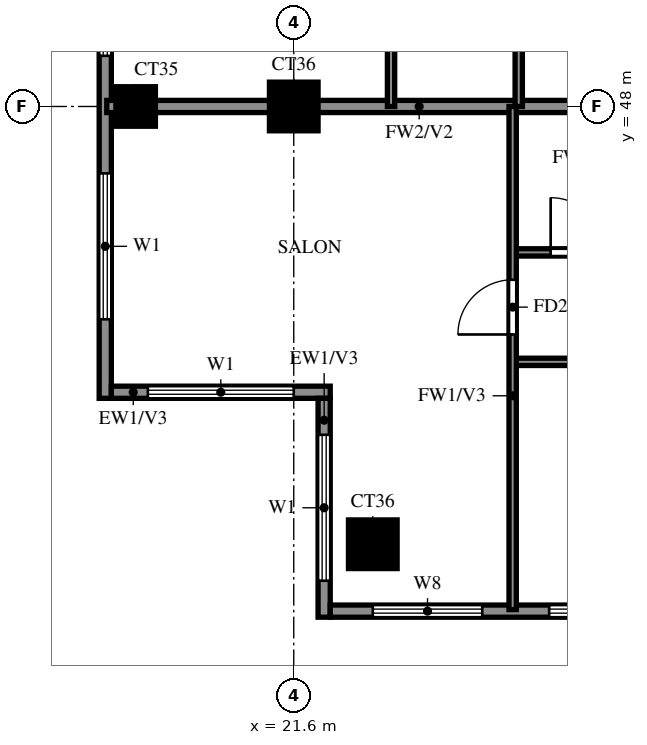
"""IFC4 building model, lengths in metres.
Left out: names, types, materials, properties, quantities, classifications, styles, units other than length and angle.
Written with IfcOpenShell. Run it as: python <this file> out.ifc"""

import sys

from ifc_helpers import new_model, si_unit, direction, frame, frame_2d, origin, origin_2d, place, context, subcontext, project, spatial, rectangle, extrude, source, transform, mapped, element, fill, save


model = new_model("IFC4")
c1 = context("Model", 3, precision=1e-05, world=origin(), true_north=direction((0.0, 1.0)))
c2 = subcontext(c1, "Body", "Model", "MODEL_VIEW")
j1 = project(units=[si_unit("LENGTHUNIT", "METRE"), si_unit("PLANEANGLEUNIT", "RADIAN")], contexts=[c1])
p1 = place(None, origin())
s1 = spatial("IfcSite", under=j1, at=p1, CompositionType="ELEMENT")
p2 = place(p1, origin())
s2 = spatial("IfcBuilding", under=s1, at=p2, CompositionType="ELEMENT")
p3 = place(p2, frame((0.0, 0.0, 232.5)))
s3 = spatial("IfcBuildingStorey", under=s2, at=p3, CompositionType="ELEMENT", Elevation=232.5)
m1 = source(origin(), c2, "Body", "SweptSolid", [
    extrude(rectangle(XDim=0.8, YDim=0.8, at=origin_2d()), origin(), (0.0, 0.0, 1.0), 3.22),
])
p4 = place(p3, frame((22.9, 40.8, 0.0), z_axis=(0.0, 0.0, 1.0), x_axis=(1.0, 0.0, 0.0)))
e1 = element("IfcColumn", 1, at=p4, inside=s3, PredefinedType="COLUMN", context=c2, shape_type="MappedRepresentation", body=[
    mapped(m1, transform((0.0, 0.0, 0.0))),
])
m2 = source(origin(), c2, "Body", "SweptSolid", [
    extrude(rectangle(XDim=0.65, YDim=0.65, at=origin_2d()), origin(), (0.0, 0.0, 1.0), 3.22),
])
p5 = place(p3, frame((19.0, 48.0, 0.0), z_axis=(0.0, 0.0, 1.0), x_axis=(1.0, 0.0, 0.0)))
e2 = element("IfcColumn", 2, at=p5, inside=s3, PredefinedType="COLUMN", context=c2, shape_type="MappedRepresentation", body=[
    mapped(m2, transform((0.0, 0.0, 0.0))),
])
p6 = place(p3, frame((21.6, 48.0, 0.0), z_axis=(0.0, 0.0, 1.0), x_axis=(1.0, 0.0, 0.0)))
e3 = element("IfcColumn", 3, at=p6, inside=s3, PredefinedType="COLUMN", context=c2, shape_type="MappedRepresentation", body=[
    mapped(m1, transform((0.0, 0.0, 0.0))),
])
p7 = place(p3, frame((18.5, 76.6, 0.0), z_axis=(0.0, 0.0, 1.0), x_axis=(0.0, -1.0, 0.0)))
e4 = element("IfcWall", 4, at=p7, inside=s3, PredefinedType="SOLIDWALL", context=c2, shape_type="SweptSolid", body=[
    extrude(rectangle(XDim=33.4, YDim=0.2, at=frame_2d((16.7, 0.0))), origin(), (0.0, 0.0, 1.0), 3.22),
])
p8 = place(p7, frame((15.1, 0.0, 0.0)))
e5 = element("IfcOpeningElement", 5, at=p8, cuts=e4, PredefinedType="OPENING", context=c2, shape_type="SweptSolid", body=[
    extrude(rectangle(XDim=1.8, YDim=2.4, at=frame_2d((0.9, 1.2))), frame((0.0, 0.11, 0.0), z_axis=(0.0, -1.0, 0.0), x_axis=(1.0, 0.0, 0.0)), (0.0, 0.0, 1.0), 0.22),
])
p9 = place(p7, frame((29.7, 0.0, 0.6)))
e6 = element("IfcOpeningElement", 6, at=p9, cuts=e4, PredefinedType="OPENING", context=c2, shape_type="SweptSolid", body=[
    extrude(rectangle(XDim=2.4, YDim=2.4, at=frame_2d((1.2, 1.2))), frame((0.0, 0.11, 0.0), z_axis=(0.0, -1.0, 0.0), x_axis=(1.0, 0.0, 0.0)), (0.0, 0.0, 1.0), 0.22),
])
p10 = place(p7, frame((22.233, 0.0, 0.6)))
e7 = element("IfcOpeningElement", 7, at=p10, cuts=e4, PredefinedType="OPENING", context=c2, shape_type="SweptSolid", body=[
    extrude(rectangle(XDim=2.4, YDim=2.4, at=frame_2d((1.2, 1.2))), frame((0.0, 0.11, 0.0), z_axis=(0.0, -1.0, 0.0), x_axis=(1.0, 0.0, 0.0)), (0.0, 0.0, 1.0), 0.22),
])
p11 = place(p7, frame((25.367, 0.0, 0.6)))
e8 = element("IfcOpeningElement", 8, at=p11, cuts=e4, PredefinedType="OPENING", context=c2, shape_type="SweptSolid", body=[
    extrude(rectangle(XDim=2.4, YDim=2.4, at=frame_2d((1.2, 1.2))), frame((0.0, 0.11, 0.0), z_axis=(0.0, -1.0, 0.0), x_axis=(1.0, 0.0, 0.0)), (0.0, 0.0, 1.0), 0.22),
])
p12 = place(p7, frame((19.3, 0.0, 0.6)))
e9 = element("IfcOpeningElement", 9, at=p12, cuts=e4, PredefinedType="OPENING", context=c2, shape_type="SweptSolid", body=[
    extrude(rectangle(XDim=1.8, YDim=2.4, at=frame_2d((0.9, 1.2))), frame((0.0, 0.11, 0.0), z_axis=(0.0, -1.0, 0.0), x_axis=(1.0, 0.0, 0.0)), (0.0, 0.0, 1.0), 0.22),
])
p13 = place(p7, frame((10.75, 0.0, 0.6)))
e10 = element("IfcOpeningElement", 10, at=p13, cuts=e4, PredefinedType="OPENING", context=c2, shape_type="SweptSolid", body=[
    extrude(rectangle(XDim=0.9, YDim=2.4, at=frame_2d((0.45, 1.2))), frame((0.0, 0.11, 0.0), z_axis=(0.0, -1.0, 0.0), x_axis=(1.0, 0.0, 0.0)), (0.0, 0.0, 1.0), 0.22),
])
p14 = place(p7, frame((12.7, 0.0, 0.6)))
e11 = element("IfcOpeningElement", 11, at=p14, cuts=e4, PredefinedType="OPENING", context=c2, shape_type="SweptSolid", body=[
    extrude(rectangle(XDim=1.2, YDim=2.4, at=frame_2d((0.6, 1.2))), frame((0.0, 0.11, 0.0), z_axis=(0.0, -1.0, 0.0), x_axis=(1.0, 0.0, 0.0)), (0.0, 0.0, 1.0), 0.22),
])
p15 = place(p7, frame((7.6, 0.0, 0.6)))
e12 = element("IfcOpeningElement", 12, at=p15, cuts=e4, PredefinedType="OPENING", context=c2, shape_type="SweptSolid", body=[
    extrude(rectangle(XDim=2.4, YDim=2.4, at=frame_2d((1.2, 1.2))), frame((0.0, 0.11, 0.0), z_axis=(0.0, -1.0, 0.0), x_axis=(1.0, 0.0, 0.0)), (0.0, 0.0, 1.0), 0.22),
])
p16 = place(p7, frame((4.0, 0.0, 0.6)))
e13 = element("IfcOpeningElement", 13, at=p16, cuts=e4, PredefinedType="OPENING", context=c2, shape_type="SweptSolid", body=[
    extrude(rectangle(XDim=2.4, YDim=2.4, at=frame_2d((1.2, 1.2))), frame((0.0, 0.11, 0.0), z_axis=(0.0, -1.0, 0.0), x_axis=(1.0, 0.0, 0.0)), (0.0, 0.0, 1.0), 0.22),
])
p17 = place(p7, frame((0.6, 0.0, 0.6)))
e14 = element("IfcOpeningElement", 14, at=p17, cuts=e4, PredefinedType="OPENING", context=c2, shape_type="SweptSolid", body=[
    extrude(rectangle(XDim=2.4, YDim=2.4, at=frame_2d((1.2, 1.2))), frame((0.0, 0.11, 0.0), z_axis=(0.0, -1.0, 0.0), x_axis=(1.0, 0.0, 0.0)), (0.0, 0.0, 1.0), 0.22),
])
p18 = place(p3, frame((18.6, 43.3, 0.0), z_axis=(0.0, 0.0, 1.0), x_axis=(1.0, 0.0, 0.0)))
e15 = element("IfcWall", 15, at=p18, inside=s3, PredefinedType="SOLIDWALL", context=c2, shape_type="SweptSolid", body=[
    extrude(rectangle(XDim=3.6, YDim=0.2, at=frame_2d((1.8, 0.0))), origin(), (0.0, 0.0, 1.0), 3.22),
])
p19 = place(p18, frame((0.6, 0.0, 0.6)))
e16 = element("IfcOpeningElement", 16, at=p19, cuts=e15, PredefinedType="OPENING", context=c2, shape_type="SweptSolid", body=[
    extrude(rectangle(XDim=2.4, YDim=2.4, at=frame_2d((1.2, 1.2))), frame((0.0, 0.11, 0.0), z_axis=(0.0, -1.0, 0.0), x_axis=(1.0, 0.0, 0.0)), (0.0, 0.0, 1.0), 0.22),
])
p20 = place(p3, frame((22.1, 43.2, 0.0), z_axis=(0.0, 0.0, 1.0), x_axis=(0.0, -1.0, 0.0)))
e17 = element("IfcWall", 17, at=p20, inside=s3, PredefinedType="SOLIDWALL", context=c2, shape_type="SweptSolid", body=[
    extrude(rectangle(XDim=3.6, YDim=0.2, at=frame_2d((1.8, 0.0))), origin(), (0.0, 0.0, 1.0), 3.22),
])
p21 = place(p20, frame((0.6, 0.0, 0.6)))
e18 = element("IfcOpeningElement", 18, at=p21, cuts=e17, PredefinedType="OPENING", context=c2, shape_type="SweptSolid", body=[
    extrude(rectangle(XDim=2.4, YDim=2.4, at=frame_2d((1.2, 1.2))), frame((0.0, 0.11, 0.0), z_axis=(0.0, -1.0, 0.0), x_axis=(1.0, 0.0, 0.0)), (0.0, 0.0, 1.0), 0.22),
])
p22 = place(p3, frame((22.2, 39.7, 0.0), z_axis=(0.0, 0.0, 1.0), x_axis=(1.0, 0.0, 0.0)))
e19 = element("IfcWall", 19, at=p22, inside=s3, PredefinedType="SOLIDWALL", context=c2, shape_type="SweptSolid", body=[
    extrude(rectangle(XDim=19.8, YDim=0.2, at=frame_2d((9.9, 0.0))), origin(), (0.0, 0.0, 1.0), 3.22),
])
p23 = place(p22, frame((0.7, 0.0, 0.6)))
e20 = element("IfcOpeningElement", 20, at=p23, cuts=e19, PredefinedType="OPENING", context=c2, shape_type="SweptSolid", body=[
    extrude(rectangle(XDim=1.8, YDim=2.4, at=frame_2d((0.9, 1.2))), frame((0.0, 0.11, 0.0), z_axis=(0.0, -1.0, 0.0), x_axis=(1.0, 0.0, 0.0)), (0.0, 0.0, 1.0), 0.22),
])
p24 = place(p22, frame((3.6, 0.0, 0.6)))
e21 = element("IfcOpeningElement", 21, at=p24, cuts=e19, PredefinedType="OPENING", context=c2, shape_type="SweptSolid", body=[
    extrude(rectangle(XDim=2.4, YDim=2.4, at=frame_2d((1.2, 1.2))), frame((0.0, 0.11, 0.0), z_axis=(0.0, -1.0, 0.0), x_axis=(1.0, 0.0, 0.0)), (0.0, 0.0, 1.0), 0.22),
])
p25 = place(p22, frame((7.8, 0.0, 0.6)))
e22 = element("IfcOpeningElement", 22, at=p25, cuts=e19, PredefinedType="OPENING", context=c2, shape_type="SweptSolid", body=[
    extrude(rectangle(XDim=2.4, YDim=2.4, at=frame_2d((1.2, 1.2))), frame((0.0, 0.11, 0.0), z_axis=(0.0, -1.0, 0.0), x_axis=(1.0, 0.0, 0.0)), (0.0, 0.0, 1.0), 0.22),
])
p26 = place(p3, frame((18.525, 48.0, 0.0), z_axis=(0.0, 0.0, 1.0), x_axis=(1.0, 0.0, 0.0)))
e23 = element("IfcWall", 23, at=p26, inside=s3, PredefinedType="SOLIDWALL", context=c2, shape_type="SweptSolid", body=[
    extrude(rectangle(XDim=10.275, YDim=0.2, at=frame_2d((5.138, 0.0))), origin(), (0.0, 0.0, 1.0), 3.22),
])
p27 = place(p3, frame((25.2, 43.8, 0.0), z_axis=(0.0, 0.0, 1.0), x_axis=(1.0, 0.0, 0.0)))
e24 = element("IfcWall", 24, at=p27, inside=s3, PredefinedType="PARTITIONING", context=c2, shape_type="SweptSolid", body=[
    extrude(rectangle(XDim=8.4, YDim=0.12, at=frame_2d((4.2, 0.0))), origin(), (0.0, 0.0, 1.0), 3.22),
])
p28 = place(p27, frame((1.35, 0.0, 0.0)))
e25 = element("IfcOpeningElement", 25, at=p28, cuts=e24, PredefinedType="OPENING", context=c2, shape_type="SweptSolid", body=[
    extrude(rectangle(XDim=0.9, YDim=2.1, at=frame_2d((0.45, 1.05))), frame((0.0, 0.07, 0.0), z_axis=(0.0, -1.0, 0.0), x_axis=(1.0, 0.0, 0.0)), (0.0, 0.0, 1.0), 0.14),
])
p29 = place(p27, frame((5.55, 0.0, 0.0)))
e26 = element("IfcOpeningElement", 26, at=p29, cuts=e24, PredefinedType="OPENING", context=c2, shape_type="SweptSolid", body=[
    extrude(rectangle(XDim=0.9, YDim=2.1, at=frame_2d((0.45, 1.05))), frame((0.0, 0.07, 0.0), z_axis=(0.0, -1.0, 0.0), x_axis=(1.0, 0.0, 0.0)), (0.0, 0.0, 1.0), 0.14),
])
p30 = place(p3, frame((25.2, 45.6, 0.0), z_axis=(0.0, 0.0, 1.0), x_axis=(1.0, 0.0, 0.0)))
e27 = element("IfcWall", 27, at=p30, inside=s3, PredefinedType="PARTITIONING", context=c2, shape_type="SweptSolid", body=[
    extrude(rectangle(XDim=6.0, YDim=0.12, at=frame_2d((3.0, 0.0))), origin(), (0.0, 0.0, 1.0), 3.22),
])
p31 = place(p30, frame((0.625, 0.0, 0.0)))
e28 = element("IfcOpeningElement", 28, at=p31, cuts=e27, PredefinedType="OPENING", context=c2, shape_type="SweptSolid", body=[
    extrude(rectangle(XDim=0.9, YDim=2.1, at=frame_2d((0.45, 1.05))), frame((0.0, 0.07, 0.0), z_axis=(0.0, -1.0, 0.0), x_axis=(1.0, 0.0, 0.0)), (0.0, 0.0, 1.0), 0.14),
])
p32 = place(p30, frame((3.625, 0.0, 0.0)))
e29 = element("IfcOpeningElement", 29, at=p32, cuts=e27, PredefinedType="OPENING", context=c2, shape_type="SweptSolid", body=[
    extrude(rectangle(XDim=0.9, YDim=2.1, at=frame_2d((0.45, 1.05))), frame((0.0, 0.07, 0.0), z_axis=(0.0, -1.0, 0.0), x_axis=(1.0, 0.0, 0.0)), (0.0, 0.0, 1.0), 0.14),
])
p33 = place(p3, frame((23.2, 48.0, 0.0), z_axis=(0.0, 0.0, 1.0), x_axis=(0.0, 1.0, 0.0)))
e30 = element("IfcWall", 30, at=p33, inside=s3, PredefinedType="PARTITIONING", context=c2, shape_type="SweptSolid", body=[
    extrude(rectangle(XDim=25.2, YDim=0.12, at=frame_2d((12.6, 0.0))), origin(), (0.0, 0.0, 1.0), 3.22),
])
p34 = place(p33, frame((2.85, 0.0, 0.0)))
e31 = element("IfcOpeningElement", 31, at=p34, cuts=e30, PredefinedType="OPENING", context=c2, shape_type="SweptSolid", body=[
    extrude(rectangle(XDim=1.5, YDim=2.1, at=frame_2d((0.75, 1.05))), frame((0.0, 0.07, 0.0), z_axis=(0.0, -1.0, 0.0), x_axis=(1.0, 0.0, 0.0)), (0.0, 0.0, 1.0), 0.14),
])
p35 = place(p33, frame((8.55, 0.0, 0.0)))
e32 = element("IfcOpeningElement", 32, at=p35, cuts=e30, PredefinedType="OPENING", context=c2, shape_type="SweptSolid", body=[
    extrude(rectangle(XDim=0.9, YDim=2.1, at=frame_2d((0.45, 1.05))), frame((0.0, 0.07, 0.0), z_axis=(0.0, -1.0, 0.0), x_axis=(1.0, 0.0, 0.0)), (0.0, 0.0, 1.0), 0.14),
])
p36 = place(p33, frame((12.15, 0.0, 0.0)))
e33 = element("IfcOpeningElement", 33, at=p36, cuts=e30, PredefinedType="OPENING", context=c2, shape_type="SweptSolid", body=[
    extrude(rectangle(XDim=0.9, YDim=2.1, at=frame_2d((0.45, 1.05))), frame((0.0, 0.07, 0.0), z_axis=(0.0, -1.0, 0.0), x_axis=(1.0, 0.0, 0.0)), (0.0, 0.0, 1.0), 0.14),
])
p37 = place(p33, frame((15.75, 0.0, 0.0)))
e34 = element("IfcOpeningElement", 34, at=p37, cuts=e30, PredefinedType="OPENING", context=c2, shape_type="SweptSolid", body=[
    extrude(rectangle(XDim=0.9, YDim=2.1, at=frame_2d((0.45, 1.05))), frame((0.0, 0.07, 0.0), z_axis=(0.0, -1.0, 0.0), x_axis=(1.0, 0.0, 0.0)), (0.0, 0.0, 1.0), 0.14),
])
p38 = place(p33, frame((19.35, 0.0, 0.0)))
e35 = element("IfcOpeningElement", 35, at=p38, cuts=e30, PredefinedType="OPENING", context=c2, shape_type="SweptSolid", body=[
    extrude(rectangle(XDim=0.9, YDim=2.1, at=frame_2d((0.45, 1.05))), frame((0.0, 0.07, 0.0), z_axis=(0.0, -1.0, 0.0), x_axis=(1.0, 0.0, 0.0)), (0.0, 0.0, 1.0), 0.14),
])
p39 = place(p33, frame((22.95, 0.0, 0.0)))
e36 = element("IfcOpeningElement", 36, at=p39, cuts=e30, PredefinedType="OPENING", context=c2, shape_type="SweptSolid", body=[
    extrude(rectangle(XDim=0.9, YDim=2.1, at=frame_2d((0.45, 1.05))), frame((0.0, 0.07, 0.0), z_axis=(0.0, -1.0, 0.0), x_axis=(1.0, 0.0, 0.0)), (0.0, 0.0, 1.0), 0.14),
])
p40 = place(p3, frame((25.2, 39.725, 0.0), z_axis=(0.0, 0.0, 1.0), x_axis=(0.0, 1.0, 0.0)))
e37 = element("IfcWall", 37, at=p40, inside=s3, PredefinedType="PARTITIONING", context=c2, shape_type="SweptSolid", body=[
    extrude(rectangle(XDim=8.275, YDim=0.12, at=frame_2d((4.137, 0.0))), origin(), (0.0, 0.0, 1.0), 3.22),
])
p41 = place(p40, frame((4.525, 0.0, 0.0)))
e38 = element("IfcOpeningElement", 38, at=p41, cuts=e37, PredefinedType="OPENING", context=c2, shape_type="SweptSolid", body=[
    extrude(rectangle(XDim=0.9, YDim=2.1, at=frame_2d((0.45, 1.05))), frame((0.0, 0.07, 0.0), z_axis=(0.0, -1.0, 0.0), x_axis=(1.0, 0.0, 0.0)), (0.0, 0.0, 1.0), 0.14),
])
p42 = place(p3, frame((25.3, 48.0, 0.0), z_axis=(0.0, 0.0, 1.0), x_axis=(0.0, 1.0, 0.0)))
e39 = element("IfcWall", 39, at=p42, inside=s3, PredefinedType="PARTITIONING", context=c2, shape_type="SweptSolid", body=[
    extrude(rectangle(XDim=2.4, YDim=0.12, at=frame_2d((1.2, 0.0))), origin(), (0.0, 0.0, 1.0), 3.22),
])
p43 = place(p9, origin())
e40 = element("IfcWindow", 40, at=p43, inside=s3, PartitioningType="DOUBLE_PANEL_VERTICAL", PredefinedType="WINDOW", context=c2, shape_type="SweptSolid", body=[
    extrude(rectangle(XDim=2.4, YDim=2.4, at=frame_2d((1.2, 1.2))), frame((0.0, 0.03, 0.0), z_axis=(0.0, -1.0, 0.0), x_axis=(1.0, 0.0, 0.0)), (0.0, 0.0, 1.0), 0.06),
])
fill(e6, e40)
p44 = place(p11, origin())
e41 = element("IfcWindow", 41, at=p44, inside=s3, PartitioningType="DOUBLE_PANEL_VERTICAL", PredefinedType="WINDOW", context=c2, shape_type="SweptSolid", body=[
    extrude(rectangle(XDim=2.4, YDim=2.4, at=frame_2d((1.2, 1.2))), frame((0.0, 0.03, 0.0), z_axis=(0.0, -1.0, 0.0), x_axis=(1.0, 0.0, 0.0)), (0.0, 0.0, 1.0), 0.06),
])
fill(e8, e41)
p45 = place(p19, origin())
e42 = element("IfcWindow", 42, at=p45, inside=s3, PartitioningType="DOUBLE_PANEL_VERTICAL", PredefinedType="WINDOW", context=c2, shape_type="SweptSolid", body=[
    extrude(rectangle(XDim=2.4, YDim=2.4, at=frame_2d((1.2, 1.2))), frame((0.0, 0.03, 0.0), z_axis=(0.0, -1.0, 0.0), x_axis=(1.0, 0.0, 0.0)), (0.0, 0.0, 1.0), 0.06),
])
fill(e16, e42)
p46 = place(p21, origin())
e43 = element("IfcWindow", 43, at=p46, inside=s3, PartitioningType="DOUBLE_PANEL_VERTICAL", PredefinedType="WINDOW", context=c2, shape_type="SweptSolid", body=[
    extrude(rectangle(XDim=2.4, YDim=2.4, at=frame_2d((1.2, 1.2))), frame((0.0, 0.03, 0.0), z_axis=(0.0, -1.0, 0.0), x_axis=(1.0, 0.0, 0.0)), (0.0, 0.0, 1.0), 0.06),
])
fill(e18, e43)
p47 = place(p23, origin())
e44 = element("IfcWindow", 44, at=p47, inside=s3, PartitioningType="DOUBLE_PANEL_VERTICAL", PredefinedType="WINDOW", context=c2, shape_type="SweptSolid", body=[
    extrude(rectangle(XDim=1.8, YDim=2.4, at=frame_2d((0.9, 1.2))), frame((0.0, 0.03, 0.0), z_axis=(0.0, -1.0, 0.0), x_axis=(1.0, 0.0, 0.0)), (0.0, 0.0, 1.0), 0.06),
])
fill(e20, e44)
p48 = place(p24, origin())
e45 = element("IfcWindow", 45, at=p48, inside=s3, PartitioningType="DOUBLE_PANEL_VERTICAL", PredefinedType="WINDOW", context=c2, shape_type="SweptSolid", body=[
    extrude(rectangle(XDim=2.4, YDim=2.4, at=frame_2d((1.2, 1.2))), frame((0.0, 0.03, 0.0), z_axis=(0.0, -1.0, 0.0), x_axis=(1.0, 0.0, 0.0)), (0.0, 0.0, 1.0), 0.06),
])
fill(e21, e45)
p49 = place(p41, origin())
e46 = element("IfcDoor", 46, at=p49, inside=s3, OperationType="SINGLE_SWING_RIGHT", PredefinedType="DOOR", context=c2, shape_type="SweptSolid", body=[
    extrude(rectangle(XDim=0.9, YDim=2.1, at=frame_2d((0.45, 1.05))), frame((0.0, 0.025, 0.0), z_axis=(0.0, -1.0, 0.0), x_axis=(1.0, 0.0, 0.0)), (0.0, 0.0, 1.0), 0.05),
])
fill(e38, e46)
p50 = place(p31, origin())
e47 = element("IfcDoor", 47, at=p50, inside=s3, OperationType="SINGLE_SWING_RIGHT", PredefinedType="DOOR", context=c2, shape_type="SweptSolid", body=[
    extrude(rectangle(XDim=0.9, YDim=2.1, at=frame_2d((0.45, 1.05))), frame((0.0, 0.025, 0.0), z_axis=(0.0, -1.0, 0.0), x_axis=(1.0, 0.0, 0.0)), (0.0, 0.0, 1.0), 0.05),
])
fill(e28, e47)
save(model, sys.argv[1])
